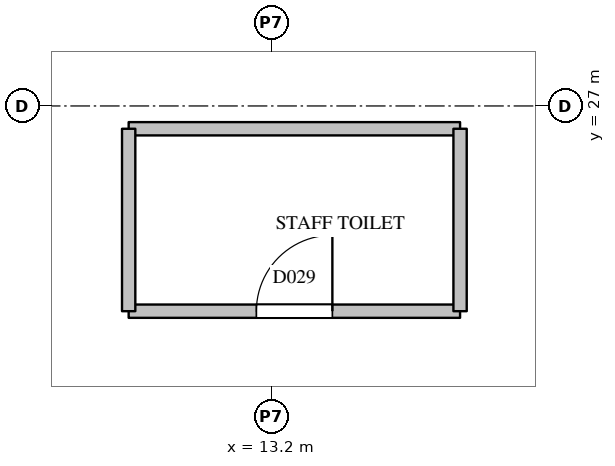
"""IFC4 building model, lengths in metres.
Left out: names, types, materials, properties, quantities, classifications, styles, units other than length and angle.
Written with IfcOpenShell. Run it as: python <this file> out.ifc"""

import sys

from ifc_helpers import new_model, si_unit, direction, frame, frame_2d, origin, place, context, subcontext, project, spatial, rectangle, extrude, element, fill, save


model = new_model("IFC4")
c1 = context("Model", 3, precision=1e-05, world=origin(), true_north=direction((0.0, 1.0)))
c2 = subcontext(c1, "Body", "Model", "MODEL_VIEW")
j1 = project(units=[si_unit("LENGTHUNIT", "METRE"), si_unit("PLANEANGLEUNIT", "RADIAN")], contexts=[c1])
p1 = place(None, origin())
s1 = spatial("IfcSite", under=j1, at=p1, CompositionType="ELEMENT")
p2 = place(p1, origin())
s2 = spatial("IfcBuilding", under=s1, at=p2, CompositionType="ELEMENT")
p3 = place(p2, frame((0.0, 0.0, 57.6)))
s3 = spatial("IfcBuildingStorey", under=s2, at=p3, CompositionType="ELEMENT", Elevation=57.6)
p4 = place(p3, frame((11.32, 24.3, 0.0), z_axis=(0.0, 0.0, 1.0), x_axis=(1.0, 0.0, 0.0)))
e1 = element("IfcWall", 1, at=p4, inside=s3, PredefinedType="PARTITIONING", context=c2, shape_type="SweptSolid", body=[
    extrude(rectangle(XDim=4.36, YDim=0.175, at=frame_2d((2.18, 0.0))), origin(), (0.0, 0.0, 1.0), 3.5),
])
p5 = place(p4, frame((1.68, 0.0, 0.0)))
e2 = element("IfcOpeningElement", 2, at=p5, cuts=e1, PredefinedType="OPENING", context=c2, shape_type="SweptSolid", body=[
    extrude(rectangle(XDim=1.0, YDim=2.1, at=frame_2d((0.5, 1.05))), frame((0.0, 0.097, 0.0), z_axis=(0.0, -1.0, 0.0), x_axis=(1.0, 0.0, 0.0)), (0.0, 0.0, 1.0), 0.195),
])
p6 = place(p3, frame((11.32, 26.7, 0.0), z_axis=(0.0, 0.0, 1.0), x_axis=(1.0, 0.0, 0.0)))
e3 = element("IfcWall", 3, at=p6, inside=s3, PredefinedType="PARTITIONING", context=c2, shape_type="SweptSolid", body=[
    extrude(rectangle(XDim=4.36, YDim=0.175, at=frame_2d((2.18, 0.0))), origin(), (0.0, 0.0, 1.0), 2.5),
])
for number, where, z_axis, x_axis in (
    (4, (11.32, 24.3, 0.0), (0.0, 0.0, 1.0), (0.0, 1.0, 0.0)),
    (5, (15.68, 24.3, 0.0), (0.0, 0.0, 1.0), (0.0, 1.0, 0.0)),
):
    element("IfcWall", number, at=place(p3, frame(where, z_axis=z_axis, x_axis=x_axis)), inside=s3, PredefinedType="PARTITIONING", context=c2, shape_type="SweptSolid", body=[
        extrude(rectangle(XDim=2.4, YDim=0.175, at=frame_2d((1.2, 0.0))), origin(), (0.0, 0.0, 1.0), 2.5),
    ])
p7 = place(p5, origin())
e6 = element("IfcDoor", 6, at=p7, inside=s3, OperationType="SINGLE_SWING_RIGHT", PredefinedType="DOOR", context=c2, shape_type="SweptSolid", body=[
    extrude(rectangle(XDim=1.0, YDim=2.1, at=frame_2d((0.5, 1.05))), frame((0.0, 0.025, 0.0), z_axis=(0.0, -1.0, 0.0), x_axis=(1.0, 0.0, 0.0)), (0.0, 0.0, 1.0), 0.05),
])
fill(e2, e6)
save(model, sys.argv[1])
